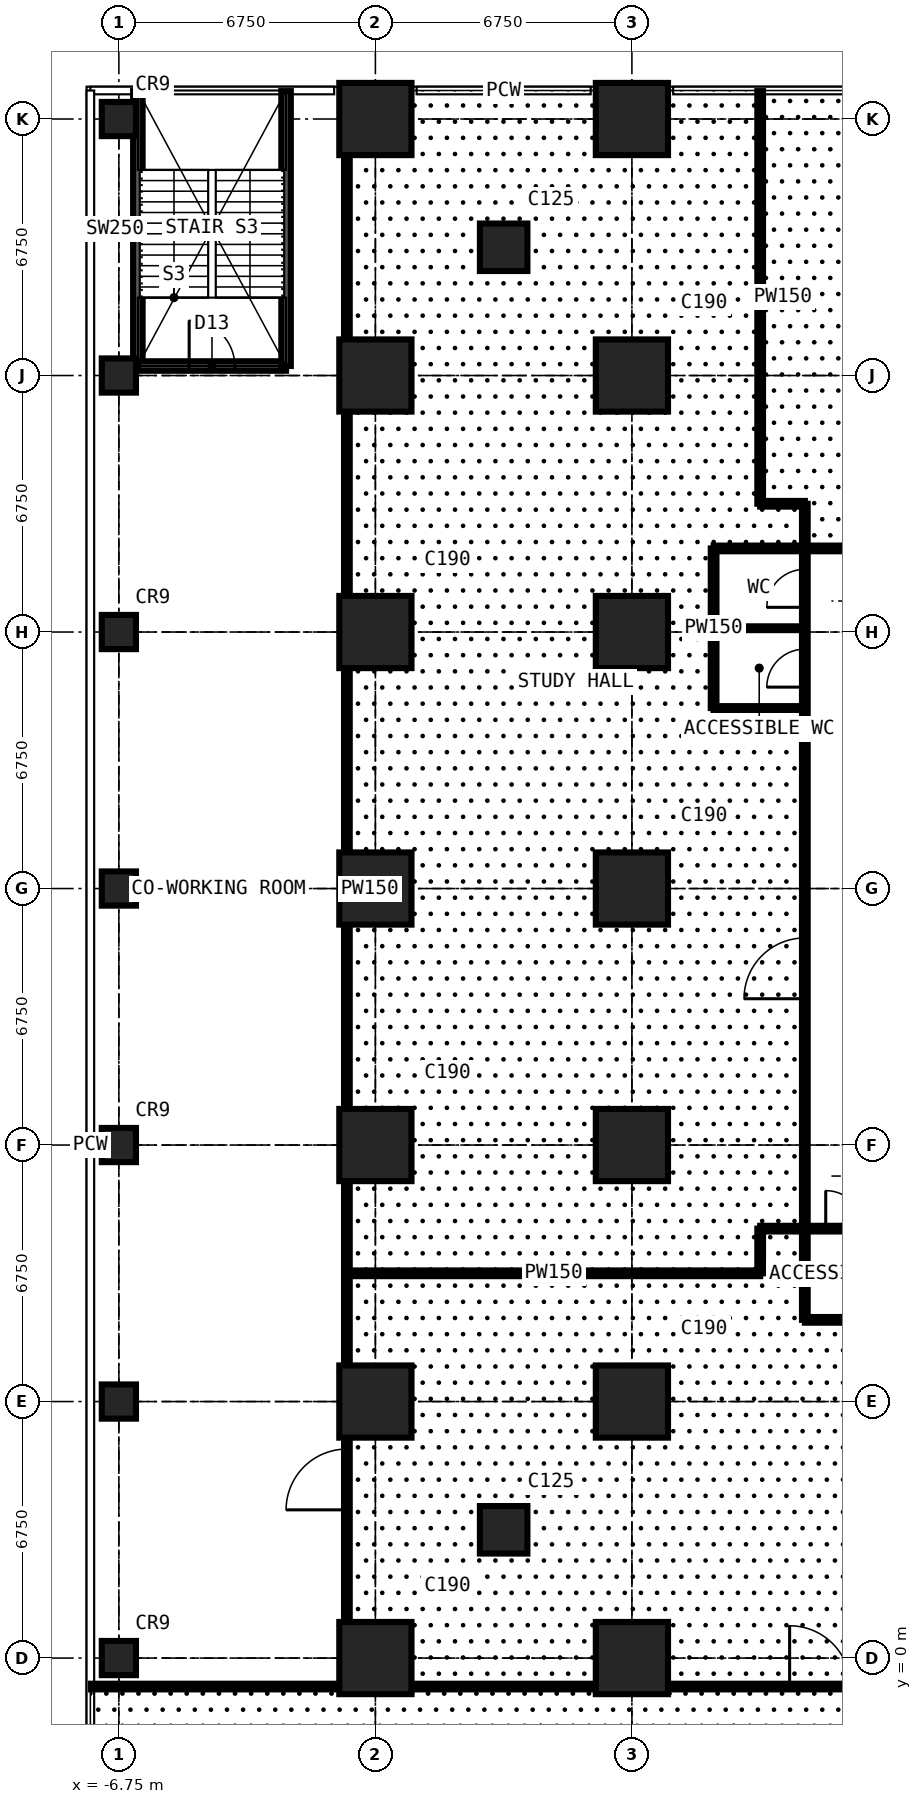
"""IFC4 building model, lengths in metres.
Left out: names, types, materials, properties, quantities, classifications, styles, units other than length and angle.
Written with IfcOpenShell. Run it as: python <this file> out.ifc"""

import sys

from ifc_helpers import new_model, si_unit, direction, frame, frame_2d, origin, origin_2d, place, context, subcontext, project, spatial, rectangle, circle, extrude, element, fill, save


model = new_model("IFC4")
c1 = context("Model", 3, precision=1e-05, world=origin(), true_north=direction((0.0, 1.0)))
c2 = subcontext(c1, "Body", "Model", "MODEL_VIEW")
j1 = project(units=[si_unit("LENGTHUNIT", "METRE"), si_unit("PLANEANGLEUNIT", "RADIAN")], contexts=[c1])
p1 = place(None, origin())
s1 = spatial("IfcSite", under=j1, at=p1, CompositionType="ELEMENT")
p2 = place(p1, origin())
s2 = spatial("IfcBuilding", under=s1, at=p2, CompositionType="ELEMENT")
p3 = place(p2, frame((0.0, 0.0, 4.5)))
s3 = spatial("IfcBuildingStorey", under=s2, at=p3, CompositionType="ELEMENT", Elevation=4.5)
for number, where, z_axis, x_axis in (
    (1, (-6.75, 0.0, 0.0), (0.0, 0.0, 1.0), (1.0, 0.0, 0.0)),
    (2, (-6.75, 6.75, 0.0), (0.0, 0.0, 1.0), (1.0, 0.0, 0.0)),
    (3, (-6.75, 13.5, 0.0), (0.0, 0.0, 1.0), (1.0, 0.0, 0.0)),
    (4, (-6.75, 20.25, 0.0), (0.0, 0.0, 1.0), (1.0, 0.0, 0.0)),
    (5, (-6.75, 27.0, 0.0), (0.0, 0.0, 1.0), (1.0, 0.0, 0.0)),
    (6, (-6.75, 33.75, 0.0), (0.0, 0.0, 1.0), (1.0, 0.0, 0.0)),
    (7, (-6.75, 40.5, 0.0), (0.0, 0.0, 1.0), (1.0, 0.0, 0.0)),
):
    element("IfcColumn", number, at=place(p3, frame(where, z_axis=z_axis, x_axis=x_axis)), inside=s3, PredefinedType="COLUMN", context=c2, shape_type="SweptSolid", body=[
        extrude(circle(Radius=0.45, at=origin_2d()), origin(), (0.0, 0.0, 1.0), 4.5),
    ])
for number, where, z_axis, x_axis in (
    (8, (0.0, 0.0, 0.0), (0.0, 0.0, 1.0), (1.0, 0.0, 0.0)),
    (9, (0.0, 6.75, 0.0), (0.0, 0.0, 1.0), (1.0, 0.0, 0.0)),
    (10, (0.0, 13.5, 0.0), (0.0, 0.0, 1.0), (1.0, 0.0, 0.0)),
    (11, (0.0, 20.25, 0.0), (0.0, 0.0, 1.0), (1.0, 0.0, 0.0)),
    (12, (0.0, 27.0, 0.0), (0.0, 0.0, 1.0), (1.0, 0.0, 0.0)),
    (13, (0.0, 33.75, 0.0), (0.0, 0.0, 1.0), (1.0, 0.0, 0.0)),
    (14, (0.0, 40.5, 0.0), (0.0, 0.0, 1.0), (1.0, 0.0, 0.0)),
):
    element("IfcColumn", number, at=place(p3, frame(where, z_axis=z_axis, x_axis=x_axis)), inside=s3, PredefinedType="COLUMN", context=c2, shape_type="SweptSolid", body=[
        extrude(rectangle(XDim=1.9, YDim=1.9, at=origin_2d()), origin(), (0.0, 0.0, 1.0), 4.5),
    ])
for number, where, z_axis, x_axis in (
    (15, (3.375, 3.375, 0.0), (0.0, 0.0, 1.0), (1.0, 0.0, 0.0)),
    (16, (3.375, 37.125, 0.0), (0.0, 0.0, 1.0), (1.0, 0.0, 0.0)),
):
    element("IfcColumn", number, at=place(p3, frame(where, z_axis=z_axis, x_axis=x_axis)), inside=s3, PredefinedType="COLUMN", context=c2, shape_type="SweptSolid", body=[
        extrude(rectangle(XDim=1.25, YDim=1.25, at=origin_2d()), origin(), (0.0, 0.0, 1.0), 4.5),
    ])
for number, where, z_axis, x_axis in (
    (17, (6.75, 0.0, 0.0), (0.0, 0.0, 1.0), (1.0, 0.0, 0.0)),
    (18, (6.75, 6.75, 0.0), (0.0, 0.0, 1.0), (1.0, 0.0, 0.0)),
    (19, (6.75, 13.5, 0.0), (0.0, 0.0, 1.0), (1.0, 0.0, 0.0)),
    (20, (6.75, 20.25, 0.0), (0.0, 0.0, 1.0), (1.0, 0.0, 0.0)),
    (21, (6.75, 27.0, 0.0), (0.0, 0.0, 1.0), (1.0, 0.0, 0.0)),
    (22, (6.75, 33.75, 0.0), (0.0, 0.0, 1.0), (1.0, 0.0, 0.0)),
    (23, (6.75, 40.5, 0.0), (0.0, 0.0, 1.0), (1.0, 0.0, 0.0)),
):
    element("IfcColumn", number, at=place(p3, frame(where, z_axis=z_axis, x_axis=x_axis)), inside=s3, PredefinedType="COLUMN", context=c2, shape_type="SweptSolid", body=[
        extrude(rectangle(XDim=1.9, YDim=1.9, at=origin_2d()), origin(), (0.0, 0.0, 1.0), 4.5),
    ])
p4 = place(p3, frame((-7.484, -0.75, 0.0), z_axis=(0.0, 0.0, 1.0), x_axis=(1.0, 0.0, 0.0)))
e24 = element("IfcWall", 24, at=p4, inside=s3, PredefinedType="PARTITIONING", context=c2, shape_type="SweptSolid", body=[
    extrude(rectangle(XDim=50.334, YDim=0.15, at=frame_2d((25.167, 0.0))), origin(), (0.0, 0.0, 1.0), 4.25),
])
p5 = place(p4, frame((18.384, 0.0, 0.0)))
e25 = element("IfcOpeningElement", 25, at=p5, cuts=e24, PredefinedType="OPENING", context=c2, shape_type="SweptSolid", body=[
    extrude(rectangle(XDim=1.6, YDim=2.4, at=frame_2d((0.8, 1.2))), frame((0.0, 0.085, 0.0), z_axis=(0.0, -1.0, 0.0), x_axis=(1.0, 0.0, 0.0)), (0.0, 0.0, 1.0), 0.17),
])
p6 = place(p4, frame((35.484, 0.0, 0.0)))
e26 = element("IfcOpeningElement", 26, at=p6, cuts=e24, PredefinedType="OPENING", context=c2, shape_type="SweptSolid", body=[
    extrude(rectangle(XDim=1.6, YDim=2.4, at=frame_2d((0.8, 1.2))), frame((0.0, 0.085, 0.0), z_axis=(0.0, -1.0, 0.0), x_axis=(1.0, 0.0, 0.0)), (0.0, 0.0, 1.0), 0.17),
])
p7 = place(p3, frame((-6.25, 34.0, 0.0), z_axis=(0.0, 0.0, 1.0), x_axis=(0.0, 1.0, 0.0)))
e27 = element("IfcWall", 27, at=p7, inside=s3, PredefinedType="SOLIDWALL", context=c2, shape_type="SweptSolid", body=[
    extrude(rectangle(XDim=7.234, YDim=0.25, at=frame_2d((3.617, 0.0))), origin(), (0.0, 0.0, 1.0), 4.25),
])
p8 = place(p3, frame((-6.25, 34.0, 0.0), z_axis=(0.0, 0.0, 1.0), x_axis=(1.0, 0.0, 0.0)))
e28 = element("IfcWall", 28, at=p8, inside=s3, PredefinedType="SOLIDWALL", context=c2, shape_type="SweptSolid", body=[
    extrude(rectangle(XDim=3.9, YDim=0.25, at=frame_2d((1.95, 0.0))), origin(), (0.0, 0.0, 1.0), 4.25),
])
p9 = place(p8, frame((1.35, 0.0, 0.0)))
e29 = element("IfcOpeningElement", 29, at=p9, cuts=e28, PredefinedType="OPENING", context=c2, shape_type="SweptSolid", body=[
    extrude(rectangle(XDim=1.2, YDim=2.2, at=frame_2d((0.6, 1.1))), frame((0.0, 0.135, 0.0), z_axis=(0.0, -1.0, 0.0), x_axis=(1.0, 0.0, 0.0)), (0.0, 0.0, 1.0), 0.27),
])
p10 = place(p3, frame((-2.35, 34.0, 0.0), z_axis=(0.0, 0.0, 1.0), x_axis=(0.0, 1.0, 0.0)))
e30 = element("IfcWall", 30, at=p10, inside=s3, PredefinedType="SOLIDWALL", context=c2, shape_type="SweptSolid", body=[
    extrude(rectangle(XDim=7.234, YDim=0.25, at=frame_2d((3.617, 0.0))), origin(), (0.0, 0.0, 1.0), 4.25),
])
p11 = place(p3, frame((-0.75, -0.75, 0.0), z_axis=(0.0, 0.0, 1.0), x_axis=(0.0, 1.0, 0.0)))
e31 = element("IfcWall", 31, at=p11, inside=s3, PredefinedType="PARTITIONING", context=c2, shape_type="SweptSolid", body=[
    extrude(rectangle(XDim=41.984, YDim=0.15, at=frame_2d((20.992, 0.0))), origin(), (0.0, 0.0, 1.0), 4.25),
])
p12 = place(p11, frame((4.65, 0.0, 0.0)))
e32 = element("IfcOpeningElement", 32, at=p12, cuts=e31, PredefinedType="OPENING", context=c2, shape_type="SweptSolid", body=[
    extrude(rectangle(XDim=1.6, YDim=2.4, at=frame_2d((0.8, 1.2))), frame((0.0, 0.085, 0.0), z_axis=(0.0, -1.0, 0.0), x_axis=(1.0, 0.0, 0.0)), (0.0, 0.0, 1.0), 0.17),
])
p13 = place(p3, frame((-0.75, 10.125, 0.0), z_axis=(0.0, 0.0, 1.0), x_axis=(1.0, 0.0, 0.0)))
e33 = element("IfcWall", 33, at=p13, inside=s3, PredefinedType="PARTITIONING", context=c2, shape_type="SweptSolid", body=[
    extrude(rectangle(XDim=10.875, YDim=0.15, at=frame_2d((5.438, 0.0))), origin(), (0.0, 0.0, 1.0), 4.25),
])
p14 = place(p3, frame((8.9, 25.0, 0.0), z_axis=(0.0, 0.0, 1.0), x_axis=(0.0, 1.0, 0.0)))
e34 = element("IfcWall", 34, at=p14, inside=s3, PredefinedType="PARTITIONING", context=c2, shape_type="SweptSolid", body=[
    extrude(rectangle(XDim=4.2, YDim=0.15, at=frame_2d((2.1, 0.0))), origin(), (0.0, 0.0, 1.0), 4.25),
])
p15 = place(p3, frame((8.9, 25.0, 0.0), z_axis=(0.0, 0.0, 1.0), x_axis=(1.0, 0.0, 0.0)))
e35 = element("IfcWall", 35, at=p15, inside=s3, PredefinedType="PARTITIONING", context=c2, shape_type="SweptSolid", body=[
    extrude(rectangle(XDim=2.4, YDim=0.1, at=frame_2d((1.2, 0.0))), origin(), (0.0, 0.0, 1.0), 4.25),
])
p16 = place(p3, frame((8.9, 27.1, 0.0), z_axis=(0.0, 0.0, 1.0), x_axis=(1.0, 0.0, 0.0)))
e36 = element("IfcWall", 36, at=p16, inside=s3, PredefinedType="PARTITIONING", context=c2, shape_type="SweptSolid", body=[
    extrude(rectangle(XDim=2.4, YDim=0.1, at=frame_2d((1.2, 0.0))), origin(), (0.0, 0.0, 1.0), 3.752),
])
p17 = place(p3, frame((8.9, 29.2, 0.0), z_axis=(0.0, 0.0, 1.0), x_axis=(1.0, 0.0, 0.0)))
e37 = element("IfcWall", 37, at=p17, inside=s3, PredefinedType="PARTITIONING", context=c2, shape_type="SweptSolid", body=[
    extrude(rectangle(XDim=21.475, YDim=0.15, at=frame_2d((10.738, 0.0))), origin(), (0.0, 0.0, 1.0), 4.25),
])
p18 = place(p17, frame((16.65, 0.0, 0.0)))
e38 = element("IfcOpeningElement", 38, at=p18, cuts=e37, PredefinedType="OPENING", context=c2, shape_type="SweptSolid", body=[
    extrude(rectangle(XDim=1.0, YDim=2.2, at=frame_2d((0.5, 1.1))), frame((0.0, 0.085, 0.0), z_axis=(0.0, -1.0, 0.0), x_axis=(1.0, 0.0, 0.0)), (0.0, 0.0, 1.0), 0.17),
])
p19 = place(p17, frame((18.75, 0.0, 0.0)))
e39 = element("IfcOpeningElement", 39, at=p19, cuts=e37, PredefinedType="OPENING", context=c2, shape_type="SweptSolid", body=[
    extrude(rectangle(XDim=1.0, YDim=2.2, at=frame_2d((0.5, 1.1))), frame((0.0, 0.085, 0.0), z_axis=(0.0, -1.0, 0.0), x_axis=(1.0, 0.0, 0.0)), (0.0, 0.0, 1.0), 0.17),
])
p20 = place(p17, frame((8.45, 0.0, 0.0)))
e40 = element("IfcOpeningElement", 40, at=p20, cuts=e37, PredefinedType="OPENING", context=c2, shape_type="SweptSolid", body=[
    extrude(rectangle(XDim=1.6, YDim=2.4, at=frame_2d((0.8, 1.2))), frame((0.0, 0.085, 0.0), z_axis=(0.0, -1.0, 0.0), x_axis=(1.0, 0.0, 0.0)), (0.0, 0.0, 1.0), 0.17),
])
p21 = place(p3, frame((10.125, 10.125, 0.0), z_axis=(0.0, 0.0, 1.0), x_axis=(0.0, 1.0, 0.0)))
e41 = element("IfcWall", 41, at=p21, inside=s3, PredefinedType="PARTITIONING", context=c2, shape_type="SweptSolid", body=[
    extrude(rectangle(XDim=1.175, YDim=0.15, at=frame_2d((0.587, 0.0))), origin(), (0.0, 0.0, 1.0), 4.25),
])
p22 = place(p3, frame((10.125, 11.3, 0.0), z_axis=(0.0, 0.0, 1.0), x_axis=(1.0, 0.0, 0.0)))
e42 = element("IfcWall", 42, at=p22, inside=s3, PredefinedType="PARTITIONING", context=c2, shape_type="SweptSolid", body=[
    extrude(rectangle(XDim=20.675, YDim=0.15, at=frame_2d((10.337, 0.0))), origin(), (0.0, 0.0, 1.0), 4.25),
])
p23 = place(p22, frame((1.725, 0.0, 0.0)))
e43 = element("IfcOpeningElement", 43, at=p23, cuts=e42, PredefinedType="OPENING", context=c2, shape_type="SweptSolid", body=[
    extrude(rectangle(XDim=1.0, YDim=2.2, at=frame_2d((0.5, 1.1))), frame((0.0, 0.085, 0.0), z_axis=(0.0, -1.0, 0.0), x_axis=(1.0, 0.0, 0.0)), (0.0, 0.0, 1.0), 0.17),
])
p24 = place(p22, frame((3.825, 0.0, 0.0)))
e44 = element("IfcOpeningElement", 44, at=p24, cuts=e42, PredefinedType="OPENING", context=c2, shape_type="SweptSolid", body=[
    extrude(rectangle(XDim=1.0, YDim=2.2, at=frame_2d((0.5, 1.1))), frame((0.0, 0.085, 0.0), z_axis=(0.0, -1.0, 0.0), x_axis=(1.0, 0.0, 0.0)), (0.0, 0.0, 1.0), 0.17),
])
p25 = place(p22, frame((10.625, 0.0, 0.0)))
e45 = element("IfcOpeningElement", 45, at=p25, cuts=e42, PredefinedType="OPENING", context=c2, shape_type="SweptSolid", body=[
    extrude(rectangle(XDim=1.6, YDim=2.4, at=frame_2d((0.8, 1.2))), frame((0.0, 0.085, 0.0), z_axis=(0.0, -1.0, 0.0), x_axis=(1.0, 0.0, 0.0)), (0.0, 0.0, 1.0), 0.17),
])
p26 = place(p3, frame((10.125, 30.375, 0.0), z_axis=(0.0, 0.0, 1.0), x_axis=(0.0, 1.0, 0.0)))
e46 = element("IfcWall", 46, at=p26, inside=s3, PredefinedType="PARTITIONING", context=c2, shape_type="SweptSolid", body=[
    extrude(rectangle(XDim=10.859, YDim=0.15, at=frame_2d((5.429, 0.0))), origin(), (0.0, 0.0, 1.0), 4.25),
])
p27 = place(p3, frame((10.125, 30.375, 0.0), z_axis=(0.0, 0.0, 1.0), x_axis=(1.0, 0.0, 0.0)))
e47 = element("IfcWall", 47, at=p27, inside=s3, PredefinedType="PARTITIONING", context=c2, shape_type="SweptSolid", body=[
    extrude(rectangle(XDim=1.175, YDim=0.15, at=frame_2d((0.587, 0.0))), origin(), (0.0, 0.0, 1.0), 4.25),
])
p28 = place(p3, frame((11.3, 8.9, 0.0), z_axis=(0.0, 0.0, 1.0), x_axis=(0.0, 1.0, 0.0)))
e48 = element("IfcWall", 48, at=p28, inside=s3, PredefinedType="PARTITIONING", context=c2, shape_type="SweptSolid", body=[
    extrude(rectangle(XDim=21.475, YDim=0.15, at=frame_2d((10.738, 0.0))), origin(), (0.0, 0.0, 1.0), 4.25),
])
p29 = place(p28, frame((16.65, 0.0, 0.0)))
e49 = element("IfcOpeningElement", 49, at=p29, cuts=e48, PredefinedType="OPENING", context=c2, shape_type="SweptSolid", body=[
    extrude(rectangle(XDim=1.0, YDim=2.2, at=frame_2d((0.5, 1.1))), frame((0.0, 0.085, 0.0), z_axis=(0.0, -1.0, 0.0), x_axis=(1.0, 0.0, 0.0)), (0.0, 0.0, 1.0), 0.17),
])
p30 = place(p28, frame((18.75, 0.0, 0.0)))
e50 = element("IfcOpeningElement", 50, at=p30, cuts=e48, PredefinedType="OPENING", context=c2, shape_type="SweptSolid", body=[
    extrude(rectangle(XDim=1.0, YDim=2.2, at=frame_2d((0.5, 1.1))), frame((0.0, 0.085, 0.0), z_axis=(0.0, -1.0, 0.0), x_axis=(1.0, 0.0, 0.0)), (0.0, 0.0, 1.0), 0.17),
])
p31 = place(p28, frame((8.45, 0.0, 0.0)))
e51 = element("IfcOpeningElement", 51, at=p31, cuts=e48, PredefinedType="OPENING", context=c2, shape_type="SweptSolid", body=[
    extrude(rectangle(XDim=1.6, YDim=2.4, at=frame_2d((0.8, 1.2))), frame((0.0, 0.085, 0.0), z_axis=(0.0, -1.0, 0.0), x_axis=(1.0, 0.0, 0.0)), (0.0, 0.0, 1.0), 0.17),
])
p32 = place(p3, frame((11.3, 8.9, 0.0), z_axis=(0.0, 0.0, 1.0), x_axis=(1.0, 0.0, 0.0)))
e52 = element("IfcWall", 52, at=p32, inside=s3, PredefinedType="PARTITIONING", context=c2, shape_type="SweptSolid", body=[
    extrude(rectangle(XDim=4.2, YDim=0.15, at=frame_2d((2.1, 0.0))), origin(), (0.0, 0.0, 1.0), 4.25),
])
p33 = place(p23, origin())
e53 = element("IfcDoor", 53, at=p33, inside=s3, OperationType="SINGLE_SWING_LEFT", PredefinedType="DOOR", context=c2, shape_type="SweptSolid", body=[
    extrude(rectangle(XDim=1.0, YDim=2.2, at=frame_2d((0.5, 1.1))), frame((0.0, 0.025, 0.0), z_axis=(0.0, -1.0, 0.0), x_axis=(1.0, 0.0, 0.0)), (0.0, 0.0, 1.0), 0.05),
])
fill(e43, e53)
p34 = place(p29, origin())
e54 = element("IfcDoor", 54, at=p34, inside=s3, OperationType="SINGLE_SWING_LEFT", PredefinedType="DOOR", context=c2, shape_type="SweptSolid", body=[
    extrude(rectangle(XDim=1.0, YDim=2.2, at=frame_2d((0.5, 1.1))), frame((0.0, 0.025, 0.0), z_axis=(0.0, -1.0, 0.0), x_axis=(1.0, 0.0, 0.0)), (0.0, 0.0, 1.0), 0.05),
])
fill(e49, e54)
p35 = place(p30, origin())
e55 = element("IfcDoor", 55, at=p35, inside=s3, OperationType="SINGLE_SWING_LEFT", PredefinedType="DOOR", context=c2, shape_type="SweptSolid", body=[
    extrude(rectangle(XDim=1.0, YDim=2.2, at=frame_2d((0.5, 1.1))), frame((0.0, 0.025, 0.0), z_axis=(0.0, -1.0, 0.0), x_axis=(1.0, 0.0, 0.0)), (0.0, 0.0, 1.0), 0.05),
])
fill(e50, e55)
p36 = place(p31, origin())
e56 = element("IfcDoor", 56, at=p36, inside=s3, OperationType="DOUBLE_DOOR_SINGLE_SWING", PredefinedType="DOOR", context=c2, shape_type="SweptSolid", body=[
    extrude(rectangle(XDim=1.6, YDim=2.4, at=frame_2d((0.8, 1.2))), frame((0.0, 0.025, 0.0), z_axis=(0.0, -1.0, 0.0), x_axis=(1.0, 0.0, 0.0)), (0.0, 0.0, 1.0), 0.05),
])
fill(e51, e56)
p37 = place(p5, origin())
e57 = element("IfcDoor", 57, at=p37, inside=s3, OperationType="DOUBLE_DOOR_SINGLE_SWING", PredefinedType="DOOR", context=c2, shape_type="SweptSolid", body=[
    extrude(rectangle(XDim=1.6, YDim=2.4, at=frame_2d((0.8, 1.2))), frame((0.0, 0.025, 0.0), z_axis=(0.0, -1.0, 0.0), x_axis=(1.0, 0.0, 0.0)), (0.0, 0.0, 1.0), 0.05),
])
fill(e25, e57)
p38 = place(p12, origin())
e58 = element("IfcDoor", 58, at=p38, inside=s3, OperationType="DOUBLE_DOOR_SINGLE_SWING", PredefinedType="DOOR", context=c2, shape_type="SweptSolid", body=[
    extrude(rectangle(XDim=1.6, YDim=2.4, at=frame_2d((0.8, 1.2))), frame((0.0, 0.025, 0.0), z_axis=(0.0, -1.0, 0.0), x_axis=(1.0, 0.0, 0.0)), (0.0, 0.0, 1.0), 0.05),
])
fill(e32, e58)
p39 = place(p9, origin())
e59 = element("IfcDoor", 59, at=p39, inside=s3, OperationType="SINGLE_SWING_LEFT", PredefinedType="DOOR", context=c2, shape_type="SweptSolid", body=[
    extrude(rectangle(XDim=1.2, YDim=2.2, at=frame_2d((0.6, 1.1))), frame((0.0, 0.025, 0.0), z_axis=(0.0, -1.0, 0.0), x_axis=(1.0, 0.0, 0.0)), (0.0, 0.0, 1.0), 0.05),
])
fill(e29, e59)
save(model, sys.argv[1])
